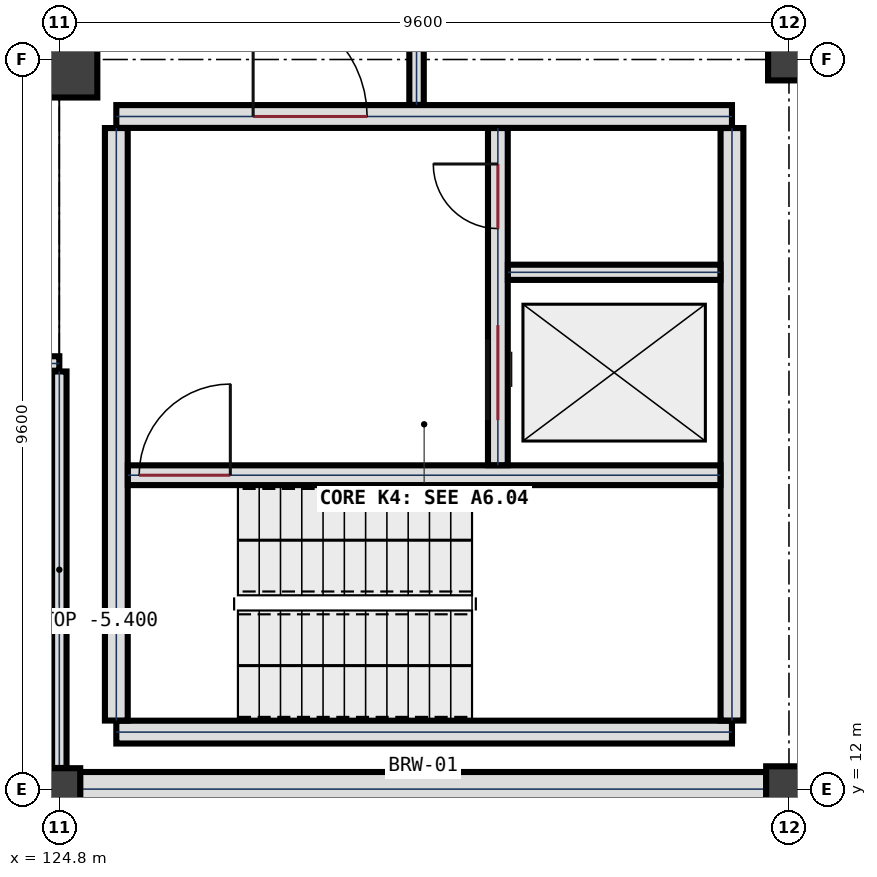
"""IFC4 building model, lengths in metres.
Left out: names, types, materials, properties, quantities, classifications, styles, units other than length and angle.
Written with IfcOpenShell. Run it as: python <this file> out.ifc"""

import sys

from ifc_helpers import new_model, si_unit, direction, frame, frame_2d, origin, origin_2d, place, context, subcontext, project, spatial, rectangle, extrude, element, fill, save


model = new_model("IFC4")
c1 = context("Model", 3, precision=1e-05, world=origin(), true_north=direction((0.0, 1.0)))
c2 = subcontext(c1, "Body", "Model", "MODEL_VIEW")
j1 = project(units=[si_unit("LENGTHUNIT", "METRE"), si_unit("PLANEANGLEUNIT", "RADIAN")], contexts=[c1])
p1 = place(None, origin())
s1 = spatial("IfcSite", under=j1, at=p1, CompositionType="ELEMENT")
p2 = place(p1, origin())
s2 = spatial("IfcBuilding", under=s1, at=p2, CompositionType="ELEMENT")
p3 = place(p2, frame((0.0, 0.0, -8.4)))
s3 = spatial("IfcBuildingStorey", under=s2, at=p3, CompositionType="ELEMENT", Elevation=-8.4)
p4 = place(p3, frame((124.8, 12.0, 0.0), z_axis=(0.0, 0.0, 1.0), x_axis=(1.0, 0.0, 0.0)))
e1 = element("IfcColumn", 1, at=p4, inside=s3, PredefinedType="COLUMN", context=c2, shape_type="SweptSolid", body=[
    extrude(rectangle(XDim=0.55, YDim=0.55, at=origin_2d()), origin(), (0.0, 0.0, 1.0), 4.2),
])
p5 = place(p3, frame((124.8, 21.6, 0.0), z_axis=(0.0, 0.0, 1.0), x_axis=(1.0, 0.0, 0.0)))
e2 = element("IfcColumn", 2, at=p5, inside=s3, PredefinedType="COLUMN", context=c2, shape_type="SweptSolid", body=[
    extrude(rectangle(XDim=1.0, YDim=1.0, at=origin_2d()), origin(), (0.0, 0.0, 1.0), 4.2),
])
p6 = place(p3, frame((134.4, 12.0, 0.0), z_axis=(0.0, 0.0, 1.0), x_axis=(1.0, 0.0, 0.0)))
e3 = element("IfcColumn", 3, at=p6, inside=s3, PredefinedType="COLUMN", context=c2, shape_type="SweptSolid", body=[
    extrude(rectangle(XDim=0.6, YDim=0.6, at=origin_2d()), origin(), (0.0, 0.0, 1.0), 4.2),
])
p7 = place(p3, frame((134.4, 21.6, 0.0), z_axis=(0.0, 0.0, 1.0), x_axis=(1.0, 0.0, 0.0)))
e4 = element("IfcColumn", 4, at=p7, inside=s3, PredefinedType="COLUMN", context=c2, shape_type="SweptSolid", body=[
    extrude(rectangle(XDim=0.55, YDim=0.55, at=origin_2d()), origin(), (0.0, 0.0, 1.0), 4.2),
])
p8 = place(p3, frame((134.102, 12.0, 0.0), z_axis=(0.0, 0.0, 1.0), x_axis=(-1.0, 0.0, 0.0)))
e5 = element("IfcWall", 5, at=p8, inside=s3, PredefinedType="USERDEFINED", context=c2, shape_type="SweptSolid", body=[
    extrude(rectangle(XDim=9.029, YDim=0.45, at=frame_2d((4.515, 0.0))), origin(), (0.0, 0.0, 1.0), 3.88),
])
p9 = place(p3, frame((133.65, 12.75, 0.0), z_axis=(0.0, 0.0, 1.0), x_axis=(-1.0, 0.0, 0.0)))
e6 = element("IfcWall", 6, at=p9, inside=s3, PredefinedType="SHEAR", context=c2, shape_type="SweptSolid", body=[
    extrude(rectangle(XDim=8.1, YDim=0.3, at=frame_2d((4.05, 0.0))), origin(), (0.0, 0.0, 1.0), 4.2),
])
p10 = place(p3, frame((125.55, 20.85, 0.0), z_axis=(0.0, 0.0, 1.0), x_axis=(1.0, 0.0, 0.0)))
e7 = element("IfcWall", 7, at=p10, inside=s3, PredefinedType="SHEAR", context=c2, shape_type="SweptSolid", body=[
    extrude(rectangle(XDim=8.1, YDim=0.3, at=frame_2d((4.05, 0.0))), origin(), (0.0, 0.0, 1.0), 4.2),
])
p11 = place(p10, frame((1.8, 0.0, 0.0)))
e8 = element("IfcOpeningElement", 8, at=p11, cuts=e7, PredefinedType="OPENING", context=c2, shape_type="SweptSolid", body=[
    extrude(rectangle(XDim=1.5, YDim=2.25, at=frame_2d((0.75, 1.125))), frame((0.0, 0.16, 0.0), z_axis=(0.0, -1.0, 0.0), x_axis=(1.0, 0.0, 0.0)), (0.0, 0.0, 1.0), 0.32),
])
for number, where, z_axis, x_axis in (
    (9, (125.55, 12.902, 0.0), (0.0, 0.0, 1.0), (0.0, 1.0, 0.0)),
    (10, (133.65, 20.698, 0.0), (0.0, 0.0, 1.0), (0.0, -1.0, 0.0)),
):
    element("IfcWall", number, at=place(p3, frame(where, z_axis=z_axis, x_axis=x_axis)), inside=s3, PredefinedType="SHEAR", context=c2, shape_type="SweptSolid", body=[
        extrude(rectangle(XDim=7.796, YDim=0.3, at=frame_2d((3.898, 0.0))), origin(), (0.0, 0.0, 1.0), 4.2),
    ])
p12 = place(p3, frame((125.702, 16.13, 0.0), z_axis=(0.0, 0.0, 1.0), x_axis=(1.0, 0.0, 0.0)))
e11 = element("IfcWall", 11, at=p12, inside=s3, PredefinedType="SHEAR", context=c2, shape_type="SweptSolid", body=[
    extrude(rectangle(XDim=7.796, YDim=0.26, at=frame_2d((3.898, 0.0))), origin(), (0.0, 0.0, 1.0), 4.2),
])
p13 = place(p12, frame((0.148, 0.0, 0.0)))
e12 = element("IfcOpeningElement", 12, at=p13, cuts=e11, PredefinedType="OPENING", context=c2, shape_type="SweptSolid", body=[
    extrude(rectangle(XDim=1.2, YDim=2.2, at=frame_2d((0.6, 1.1))), frame((0.0, 0.14, 0.0), z_axis=(0.0, -1.0, 0.0), x_axis=(1.0, 0.0, 0.0)), (0.0, 0.0, 1.0), 0.28),
])
p14 = place(p3, frame((130.57, 16.262, 0.0), z_axis=(0.0, 0.0, 1.0), x_axis=(0.0, 1.0, 0.0)))
e13 = element("IfcWall", 13, at=p14, inside=s3, PredefinedType="SHEAR", context=c2, shape_type="SweptSolid", body=[
    extrude(rectangle(XDim=4.436, YDim=0.26, at=frame_2d((2.218, 0.0))), origin(), (0.0, 0.0, 1.0), 4.2),
])
p15 = place(p14, frame((3.113, 0.0, 0.0)))
e14 = element("IfcOpeningElement", 14, at=p15, cuts=e13, PredefinedType="OPENING", context=c2, shape_type="SweptSolid", body=[
    extrude(rectangle(XDim=0.85, YDim=2.05, at=frame_2d((0.425, 1.025))), frame((0.0, 0.14, 0.0), z_axis=(0.0, -1.0, 0.0), x_axis=(1.0, 0.0, 0.0)), (0.0, 0.0, 1.0), 0.28),
])
p16 = place(p14, frame((0.593, 0.0, 0.0)))
e15 = element("IfcOpeningElement", 15, at=p16, cuts=e13, PredefinedType="OPENING", context=c2, shape_type="SweptSolid", body=[
    extrude(rectangle(XDim=1.25, YDim=2.2, at=frame_2d((0.625, 1.1))), frame((0.0, 0.14, 0.0), z_axis=(0.0, -1.0, 0.0), x_axis=(1.0, 0.0, 0.0)), (0.0, 0.0, 1.0), 0.28),
])
p17 = place(p3, frame((130.702, 18.8, 0.0), z_axis=(0.0, 0.0, 1.0), x_axis=(1.0, 0.0, 0.0)))
e16 = element("IfcWall", 16, at=p17, inside=s3, PredefinedType="PLUMBINGWALL", context=c2, shape_type="SweptSolid", body=[
    extrude(rectangle(XDim=2.796, YDim=0.2, at=frame_2d((1.398, 0.0))), origin(), (0.0, 0.0, 1.0), 3.88),
])
p18 = place(p3, frame((84.25, 17.6, 0.0), z_axis=(0.0, 0.0, 1.0), x_axis=(1.0, 0.0, 0.0)))
e17 = element("IfcWall", 17, at=p18, inside=s3, PredefinedType="PARTITIONING", context=c2, shape_type="SweptSolid", body=[
    extrude(rectangle(XDim=40.55, YDim=0.19, at=frame_2d((20.275, 0.0))), origin(), (0.0, 0.0, 1.0), 2.9),
])
p19 = place(p18, frame((8.575, 0.0, 0.0)))
e18 = element("IfcOpeningElement", 18, at=p19, cuts=e17, PredefinedType="OPENING", context=c2, shape_type="SweptSolid", body=[
    extrude(rectangle(XDim=1.35, YDim=2.25, at=frame_2d((0.675, 1.125))), frame((0.0, 0.105, 0.0), z_axis=(0.0, -1.0, 0.0), x_axis=(1.0, 0.0, 0.0)), (0.0, 0.0, 1.0), 0.21),
])
p20 = place(p3, frame((124.8, 12.278, 0.0), z_axis=(0.0, 0.0, 1.0), x_axis=(0.0, 1.0, 0.0)))
e19 = element("IfcWall", 19, at=p20, inside=s3, PredefinedType="PARTITIONING", context=c2, shape_type="SweptSolid", body=[
    extrude(rectangle(XDim=5.217, YDim=0.19, at=frame_2d((2.608, 0.0))), origin(), (0.0, 0.0, 1.0), 3.0),
])
p21 = place(p3, frame((129.5, 21.003, 0.0), z_axis=(0.0, 0.0, 1.0), x_axis=(0.0, 1.0, 0.0)))
e20 = element("IfcWall", 20, at=p21, inside=s3, PredefinedType="PARTITIONING", context=c2, shape_type="SweptSolid", body=[
    extrude(rectangle(XDim=19.692, YDim=0.19, at=frame_2d((9.846, 0.0))), origin(), (0.0, 0.0, 1.0), 2.87),
])
p22 = place(p21, frame((4.722, 0.0, 0.0)))
e21 = element("IfcOpeningElement", 21, at=p22, cuts=e20, PredefinedType="OPENING", context=c2, shape_type="SweptSolid", body=[
    extrude(rectangle(XDim=1.35, YDim=2.25, at=frame_2d((0.675, 1.125))), frame((0.0, 0.105, 0.0), z_axis=(0.0, -1.0, 0.0), x_axis=(1.0, 0.0, 0.0)), (0.0, 0.0, 1.0), 0.21),
])
p23 = place(p11, origin())
e22 = element("IfcDoor", 22, at=p23, inside=s3, OperationType="SINGLE_SWING_LEFT", PredefinedType="DOOR", context=c2, shape_type="SweptSolid", body=[
    extrude(rectangle(XDim=1.5, YDim=2.25, at=frame_2d((0.75, 1.125))), frame((0.0, 0.032, 0.0), z_axis=(0.0, -1.0, 0.0), x_axis=(1.0, 0.0, 0.0)), (0.0, 0.0, 1.0), 0.065),
])
fill(e8, e22)
p24 = place(p13, origin())
e23 = element("IfcDoor", 23, at=p24, inside=s3, OperationType="SINGLE_SWING_RIGHT", PredefinedType="DOOR", context=c2, shape_type="SweptSolid", body=[
    extrude(rectangle(XDim=1.2, YDim=2.2, at=frame_2d((0.6, 1.1))), frame((0.0, 0.032, 0.0), z_axis=(0.0, -1.0, 0.0), x_axis=(1.0, 0.0, 0.0)), (0.0, 0.0, 1.0), 0.065),
])
fill(e12, e23)
p25 = place(p15, origin())
e24 = element("IfcDoor", 24, at=p25, inside=s3, OperationType="SINGLE_SWING_RIGHT", PredefinedType="DOOR", context=c2, shape_type="SweptSolid", body=[
    extrude(rectangle(XDim=0.85, YDim=2.05, at=frame_2d((0.425, 1.025))), frame((0.0, 0.032, 0.0), z_axis=(0.0, -1.0, 0.0), x_axis=(1.0, 0.0, 0.0)), (0.0, 0.0, 1.0), 0.065),
])
fill(e14, e24)
p26 = place(p16, origin())
e25 = element("IfcDoor", 25, at=p26, inside=s3, OperationType="SLIDING_TO_LEFT", PredefinedType="DOOR", context=c2, shape_type="SweptSolid", body=[
    extrude(rectangle(XDim=1.25, YDim=2.2, at=frame_2d((0.625, 1.1))), frame((0.0, 0.032, 0.0), z_axis=(0.0, -1.0, 0.0), x_axis=(1.0, 0.0, 0.0)), (0.0, 0.0, 1.0), 0.065),
])
fill(e15, e25)
save(model, sys.argv[1])
